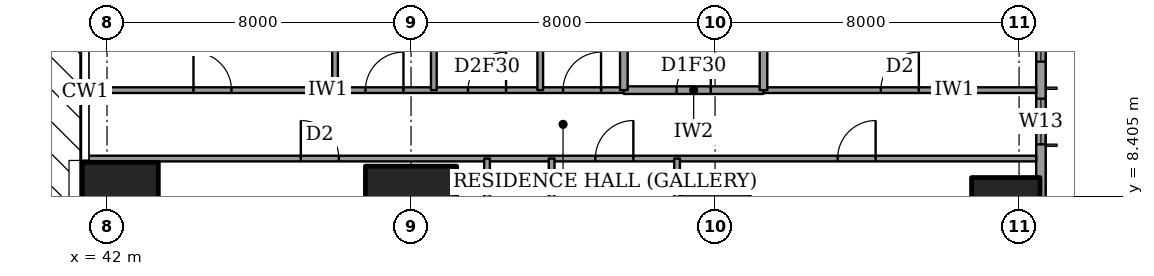
"""IFC4 building model, lengths in metres.
Left out: names, types, materials, properties, quantities, classifications, styles, units other than length and angle.
Written with IfcOpenShell. Run it as: python <this file> out.ifc"""

import sys

from ifc_helpers import new_model, si_unit, direction, frame, frame_2d, origin, origin_2d, place, context, subcontext, project, spatial, rectangle, extrude, element, fill, save


model = new_model("IFC4")
c1 = context("Model", 3, precision=1e-05, world=origin(), true_north=direction((0.0, 1.0)))
c2 = subcontext(c1, "Body", "Model", "MODEL_VIEW")
j1 = project(units=[si_unit("LENGTHUNIT", "METRE"), si_unit("PLANEANGLEUNIT", "RADIAN")], contexts=[c1])
p1 = place(None, origin())
s1 = spatial("IfcSite", under=j1, at=p1, CompositionType="ELEMENT")
p2 = place(p1, origin())
s2 = spatial("IfcBuilding", under=s1, at=p2, CompositionType="ELEMENT")
p3 = place(p2, frame((0.0, 0.0, 182.2)))
s3 = spatial("IfcBuildingStorey", under=s2, at=p3, CompositionType="ELEMENT", Elevation=182.2)
p4 = place(p3, frame((42.35, 8.0, 0.0), z_axis=(0.0, 0.0, 1.0), x_axis=(1.0, 0.0, 0.0)))
e1 = element("IfcColumn", 1, at=p4, inside=s3, PredefinedType="COLUMN", context=c2, shape_type="SweptSolid", body=[
    extrude(rectangle(XDim=2.0, YDim=2.6, at=origin_2d()), origin(), (0.0, 0.0, 1.0), 3.6),
])
p5 = place(p3, frame((50.0, 8.0, 0.0), z_axis=(0.0, 0.0, 1.0), x_axis=(1.0, 0.0, 0.0)))
e2 = element("IfcColumn", 2, at=p5, inside=s3, PredefinedType="COLUMN", context=c2, shape_type="SweptSolid", body=[
    extrude(rectangle(XDim=2.4, YDim=2.4, at=origin_2d()), origin(), (0.0, 0.0, 1.0), 3.6),
])
for number, where, z_axis, x_axis in (
    (3, (58.0, 8.0, 0.0), (0.0, 0.0, 1.0), (1.0, 0.0, 0.0)),
    (4, (65.65, 8.0, 0.0), (0.0, 0.0, 1.0), (1.0, 0.0, 0.0)),
):
    element("IfcColumn", number, at=place(p3, frame(where, z_axis=z_axis, x_axis=x_axis)), inside=s3, PredefinedType="COLUMN", context=c2, shape_type="SweptSolid", body=[
        extrude(rectangle(XDim=1.8, YDim=1.8, at=origin_2d()), origin(), (0.0, 0.0, 1.0), 3.6),
    ])
p6 = place(p3, frame((66.575, 3.175, 0.0), z_axis=(0.0, 0.0, 1.0), x_axis=(0.0, 1.0, 0.0)))
e5 = element("IfcWall", 5, at=p6, inside=s3, PredefinedType="SOLIDWALL", context=c2, shape_type="SweptSolid", body=[
    extrude(rectangle(XDim=41.65, YDim=0.25, at=frame_2d((20.825, 0.0))), origin(), (0.0, 0.0, 1.0), 3.6),
])
p7 = place(p6, frame((0.825, 0.0, 0.2)))
e6 = element("IfcOpeningElement", 6, at=p7, cuts=e5, PredefinedType="OPENING", context=c2, shape_type="SweptSolid", body=[
    extrude(rectangle(XDim=2.4, YDim=2.4, at=frame_2d((1.2, 1.2))), frame((0.0, 0.135, 0.0), z_axis=(0.0, -1.0, 0.0), x_axis=(1.0, 0.0, 0.0)), (0.0, 0.0, 1.0), 0.27),
])
p8 = place(p6, frame((6.6, 0.0, 0.2)))
e7 = element("IfcOpeningElement", 7, at=p8, cuts=e5, PredefinedType="OPENING", context=c2, shape_type="SweptSolid", body=[
    extrude(rectangle(XDim=1.2, YDim=2.4, at=frame_2d((0.6, 1.2))), frame((0.0, 0.135, 0.0), z_axis=(0.0, -1.0, 0.0), x_axis=(1.0, 0.0, 0.0)), (0.0, 0.0, 1.0), 0.27),
])
p9 = place(p6, frame((8.775, 0.0, 0.2)))
e8 = element("IfcOpeningElement", 8, at=p9, cuts=e5, PredefinedType="OPENING", context=c2, shape_type="SweptSolid", body=[
    extrude(rectangle(XDim=2.4, YDim=2.4, at=frame_2d((1.2, 1.2))), frame((0.0, 0.135, 0.0), z_axis=(0.0, -1.0, 0.0), x_axis=(1.0, 0.0, 0.0)), (0.0, 0.0, 1.0), 0.27),
])
p10 = place(p6, frame((15.675, 0.0, 0.2)))
e9 = element("IfcOpeningElement", 9, at=p10, cuts=e5, PredefinedType="OPENING", context=c2, shape_type="SweptSolid", body=[
    extrude(rectangle(XDim=2.4, YDim=2.4, at=frame_2d((1.2, 1.2))), frame((0.0, 0.135, 0.0), z_axis=(0.0, -1.0, 0.0), x_axis=(1.0, 0.0, 0.0)), (0.0, 0.0, 1.0), 0.27),
])
p11 = place(p6, frame((23.575, 0.0, 0.2)))
e10 = element("IfcOpeningElement", 10, at=p11, cuts=e5, PredefinedType="OPENING", context=c2, shape_type="SweptSolid", body=[
    extrude(rectangle(XDim=2.4, YDim=2.4, at=frame_2d((1.2, 1.2))), frame((0.0, 0.135, 0.0), z_axis=(0.0, -1.0, 0.0), x_axis=(1.0, 0.0, 0.0)), (0.0, 0.0, 1.0), 0.27),
])
p12 = place(p6, frame((30.775, 0.0, 0.2)))
e11 = element("IfcOpeningElement", 11, at=p12, cuts=e5, PredefinedType="OPENING", context=c2, shape_type="SweptSolid", body=[
    extrude(rectangle(XDim=2.4, YDim=2.4, at=frame_2d((1.2, 1.2))), frame((0.0, 0.135, 0.0), z_axis=(0.0, -1.0, 0.0), x_axis=(1.0, 0.0, 0.0)), (0.0, 0.0, 1.0), 0.27),
])
p13 = place(p6, frame((34.55, 0.0, 0.2)))
e12 = element("IfcOpeningElement", 12, at=p13, cuts=e5, PredefinedType="OPENING", context=c2, shape_type="SweptSolid", body=[
    extrude(rectangle(XDim=1.2, YDim=2.4, at=frame_2d((0.6, 1.2))), frame((0.0, 0.135, 0.0), z_axis=(0.0, -1.0, 0.0), x_axis=(1.0, 0.0, 0.0)), (0.0, 0.0, 1.0), 0.27),
])
p14 = place(p6, frame((38.425, 0.0, 0.2)))
e13 = element("IfcOpeningElement", 13, at=p14, cuts=e5, PredefinedType="OPENING", context=c2, shape_type="SweptSolid", body=[
    extrude(rectangle(XDim=2.4, YDim=2.4, at=frame_2d((1.2, 1.2))), frame((0.0, 0.135, 0.0), z_axis=(0.0, -1.0, 0.0), x_axis=(1.0, 0.0, 0.0)), (0.0, 0.0, 1.0), 0.27),
])
p15 = place(p3, frame((41.439, 9.4, 0.0), z_axis=(0.0, 0.0, 1.0), x_axis=(1.0, 0.0, 0.0)))
e14 = element("IfcWall", 14, at=p15, inside=s3, PredefinedType="PARTITIONING", context=c2, shape_type="SweptSolid", body=[
    extrude(rectangle(XDim=25.011, YDim=0.15, at=frame_2d((12.505, 0.0))), origin(), (0.0, 0.0, 1.0), 3.35),
])
p16 = place(p15, frame((19.786, 0.0, 0.0)))
e15 = element("IfcOpeningElement", 15, at=p16, cuts=e14, PredefinedType="OPENING", context=c2, shape_type="SweptSolid", body=[
    extrude(rectangle(XDim=1.0, YDim=2.1, at=frame_2d((0.5, 1.05))), frame((0.0, 0.085, 0.0), z_axis=(0.0, -1.0, 0.0), x_axis=(1.0, 0.0, 0.0)), (0.0, 0.0, 1.0), 0.17),
])
p17 = place(p15, frame((13.411, 0.0, 0.0)))
e16 = element("IfcOpeningElement", 16, at=p17, cuts=e14, PredefinedType="OPENING", context=c2, shape_type="SweptSolid", body=[
    extrude(rectangle(XDim=1.0, YDim=2.1, at=frame_2d((0.5, 1.05))), frame((0.0, 0.085, 0.0), z_axis=(0.0, -1.0, 0.0), x_axis=(1.0, 0.0, 0.0)), (0.0, 0.0, 1.0), 0.17),
])
p18 = place(p15, frame((5.661, 0.0, 0.0)))
e17 = element("IfcOpeningElement", 17, at=p18, cuts=e14, PredefinedType="OPENING", context=c2, shape_type="SweptSolid", body=[
    extrude(rectangle(XDim=1.0, YDim=2.1, at=frame_2d((0.5, 1.05))), frame((0.0, 0.085, 0.0), z_axis=(0.0, -1.0, 0.0), x_axis=(1.0, 0.0, 0.0)), (0.0, 0.0, 1.0), 0.17),
])
p19 = place(p3, frame((55.6, 11.2, 0.0), z_axis=(0.0, 0.0, 1.0), x_axis=(1.0, 0.0, 0.0)))
e18 = element("IfcWall", 18, at=p19, inside=s3, PredefinedType="PARTITIONING", context=c2, shape_type="SweptSolid", body=[
    extrude(rectangle(XDim=3.675, YDim=0.2, at=frame_2d((1.837, 0.0))), origin(), (0.0, 0.0, 1.0), 3.35),
])
p20 = place(p19, frame((1.387, 0.0, 0.0)))
e19 = element("IfcOpeningElement", 19, at=p20, cuts=e18, PredefinedType="OPENING", context=c2, shape_type="SweptSolid", body=[
    extrude(rectangle(XDim=0.9, YDim=2.1, at=frame_2d((0.45, 1.05))), frame((0.0, 0.11, 0.0), z_axis=(0.0, -1.0, 0.0), x_axis=(1.0, 0.0, 0.0)), (0.0, 0.0, 1.0), 0.22),
])
p21 = place(p3, frame((41.439, 11.2, 0.0), z_axis=(0.0, 0.0, 1.0), x_axis=(1.0, 0.0, 0.0)))
e20 = element("IfcWall", 20, at=p21, inside=s3, PredefinedType="PARTITIONING", context=c2, shape_type="SweptSolid", body=[
    extrude(rectangle(XDim=14.161, YDim=0.15, at=frame_2d((7.081, 0.0))), origin(), (0.0, 0.0, 1.0), 3.35),
])
p22 = place(p21, frame((12.561, 0.0, 0.0)))
e21 = element("IfcOpeningElement", 21, at=p22, cuts=e20, PredefinedType="OPENING", context=c2, shape_type="SweptSolid", body=[
    extrude(rectangle(XDim=1.0, YDim=2.1, at=frame_2d((0.5, 1.05))), frame((0.0, 0.085, 0.0), z_axis=(0.0, -1.0, 0.0), x_axis=(1.0, 0.0, 0.0)), (0.0, 0.0, 1.0), 0.17),
])
p23 = place(p21, frame((10.061, 0.0, 0.0)))
e22 = element("IfcOpeningElement", 22, at=p23, cuts=e20, PredefinedType="OPENING", context=c2, shape_type="SweptSolid", body=[
    extrude(rectangle(XDim=1.0, YDim=2.1, at=frame_2d((0.5, 1.05))), frame((0.0, 0.085, 0.0), z_axis=(0.0, -1.0, 0.0), x_axis=(1.0, 0.0, 0.0)), (0.0, 0.0, 1.0), 0.17),
])
p24 = place(p21, frame((7.361, 0.0, 0.0)))
e23 = element("IfcOpeningElement", 23, at=p24, cuts=e20, PredefinedType="OPENING", context=c2, shape_type="SweptSolid", body=[
    extrude(rectangle(XDim=1.0, YDim=2.1, at=frame_2d((0.5, 1.05))), frame((0.0, 0.085, 0.0), z_axis=(0.0, -1.0, 0.0), x_axis=(1.0, 0.0, 0.0)), (0.0, 0.0, 1.0), 0.17),
])
p25 = place(p21, frame((2.836, 0.0, 0.0)))
e24 = element("IfcOpeningElement", 24, at=p25, cuts=e20, PredefinedType="OPENING", context=c2, shape_type="SweptSolid", body=[
    extrude(rectangle(XDim=1.0, YDim=2.1, at=frame_2d((0.5, 1.05))), frame((0.0, 0.085, 0.0), z_axis=(0.0, -1.0, 0.0), x_axis=(1.0, 0.0, 0.0)), (0.0, 0.0, 1.0), 0.17),
])
p26 = place(p3, frame((59.275, 11.2, 0.0), z_axis=(0.0, 0.0, 1.0), x_axis=(1.0, 0.0, 0.0)))
e25 = element("IfcWall", 25, at=p26, inside=s3, PredefinedType="PARTITIONING", context=c2, shape_type="SweptSolid", body=[
    extrude(rectangle(XDim=7.175, YDim=0.15, at=frame_2d((3.587, 0.0))), origin(), (0.0, 0.0, 1.0), 3.35),
])
p27 = place(p26, frame((3.087, 0.0, 0.0)))
e26 = element("IfcOpeningElement", 26, at=p27, cuts=e25, PredefinedType="OPENING", context=c2, shape_type="SweptSolid", body=[
    extrude(rectangle(XDim=1.0, YDim=2.1, at=frame_2d((0.5, 1.05))), frame((0.0, 0.085, 0.0), z_axis=(0.0, -1.0, 0.0), x_axis=(1.0, 0.0, 0.0)), (0.0, 0.0, 1.0), 0.17),
])
p28 = place(p3, frame((48.0, 11.2, 0.0), z_axis=(0.0, 0.0, 1.0), x_axis=(0.0, 1.0, 0.0)))
e27 = element("IfcWall", 27, at=p28, inside=s3, PredefinedType="PARTITIONING", context=c2, shape_type="SweptSolid", body=[
    extrude(rectangle(XDim=6.8, YDim=0.15, at=frame_2d((3.4, 0.0))), origin(), (0.0, 0.0, 1.0), 3.35),
])
p29 = place(p3, frame((50.6, 11.2, 0.0), z_axis=(0.0, 0.0, 1.0), x_axis=(0.0, 1.0, 0.0)))
e28 = element("IfcWall", 28, at=p29, inside=s3, PredefinedType="PARTITIONING", context=c2, shape_type="SweptSolid", body=[
    extrude(rectangle(XDim=3.6, YDim=0.15, at=frame_2d((1.8, 0.0))), origin(), (0.0, 0.0, 1.0), 3.35),
])
p30 = place(p3, frame((52.0, -0.45, 0.0), z_axis=(0.0, 0.0, 1.0), x_axis=(0.0, 1.0, 0.0)))
e29 = element("IfcWall", 29, at=p30, inside=s3, PredefinedType="PARTITIONING", context=c2, shape_type="SweptSolid", body=[
    extrude(rectangle(XDim=9.85, YDim=0.15, at=frame_2d((4.925, 0.0))), origin(), (0.0, 0.0, 1.0), 3.35),
])
p31 = place(p3, frame((53.4, 11.2, 0.0), z_axis=(0.0, 0.0, 1.0), x_axis=(0.0, 1.0, 0.0)))
e30 = element("IfcWall", 30, at=p31, inside=s3, PredefinedType="PARTITIONING", context=c2, shape_type="SweptSolid", body=[
    extrude(rectangle(XDim=6.8, YDim=0.15, at=frame_2d((3.4, 0.0))), origin(), (0.0, 0.0, 1.0), 3.35),
])
p32 = place(p3, frame((53.7, -0.45, 0.0), z_axis=(0.0, 0.0, 1.0), x_axis=(0.0, 1.0, 0.0)))
e31 = element("IfcWall", 31, at=p32, inside=s3, PredefinedType="PARTITIONING", context=c2, shape_type="SweptSolid", body=[
    extrude(rectangle(XDim=9.85, YDim=0.15, at=frame_2d((4.925, 0.0))), origin(), (0.0, 0.0, 1.0), 3.35),
])
p33 = place(p32, frame((4.475, 0.0, 0.0)))
e32 = element("IfcOpeningElement", 32, at=p33, cuts=e31, PredefinedType="OPENING", context=c2, shape_type="SweptSolid", body=[
    extrude(rectangle(XDim=0.9, YDim=2.1, at=frame_2d((0.45, 1.05))), frame((0.0, 0.085, 0.0), z_axis=(0.0, -1.0, 0.0), x_axis=(1.0, 0.0, 0.0)), (0.0, 0.0, 1.0), 0.17),
])
p34 = place(p3, frame((55.6, 11.2, 0.0), z_axis=(0.0, 0.0, 1.0), x_axis=(0.0, 1.0, 0.0)))
e33 = element("IfcWall", 33, at=p34, inside=s3, PredefinedType="PARTITIONING", context=c2, shape_type="SweptSolid", body=[
    extrude(rectangle(XDim=3.4, YDim=0.2, at=frame_2d((1.7, 0.0))), origin(), (0.0, 0.0, 1.0), 3.35),
])
p35 = place(p3, frame((57.0, -0.45, 0.0), z_axis=(0.0, 0.0, 1.0), x_axis=(0.0, 1.0, 0.0)))
e34 = element("IfcWall", 34, at=p35, inside=s3, PredefinedType="PARTITIONING", context=c2, shape_type="SweptSolid", body=[
    extrude(rectangle(XDim=9.85, YDim=0.15, at=frame_2d((4.925, 0.0))), origin(), (0.0, 0.0, 1.0), 3.35),
])
p36 = place(p3, frame((59.275, 11.2, 0.0), z_axis=(0.0, 0.0, 1.0), x_axis=(0.0, 1.0, 0.0)))
e35 = element("IfcWall", 35, at=p36, inside=s3, PredefinedType="PARTITIONING", context=c2, shape_type="SweptSolid", body=[
    extrude(rectangle(XDim=3.4, YDim=0.2, at=frame_2d((1.7, 0.0))), origin(), (0.0, 0.0, 1.0), 3.35),
])
p37 = place(p8, origin())
e36 = element("IfcWindow", 36, at=p37, inside=s3, PartitioningType="SINGLE_PANEL", PredefinedType="WINDOW", context=c2, shape_type="SweptSolid", body=[
    extrude(rectangle(XDim=1.2, YDim=2.4, at=frame_2d((0.6, 1.2))), frame((0.0, 0.03, 0.0), z_axis=(0.0, -1.0, 0.0), x_axis=(1.0, 0.0, 0.0)), (0.0, 0.0, 1.0), 0.06),
])
fill(e7, e36)
p38 = place(p9, origin())
e37 = element("IfcWindow", 37, at=p38, inside=s3, PartitioningType="SINGLE_PANEL", PredefinedType="WINDOW", context=c2, shape_type="SweptSolid", body=[
    extrude(rectangle(XDim=2.4, YDim=2.4, at=frame_2d((1.2, 1.2))), frame((0.0, 0.03, 0.0), z_axis=(0.0, -1.0, 0.0), x_axis=(1.0, 0.0, 0.0)), (0.0, 0.0, 1.0), 0.06),
])
fill(e8, e37)
p39 = place(p16, origin())
e38 = element("IfcDoor", 38, at=p39, inside=s3, OperationType="SINGLE_SWING_LEFT", PredefinedType="DOOR", context=c2, shape_type="SweptSolid", body=[
    extrude(rectangle(XDim=1.0, YDim=2.1, at=frame_2d((0.5, 1.05))), frame((0.0, 0.025, 0.0), z_axis=(0.0, -1.0, 0.0), x_axis=(1.0, 0.0, 0.0)), (0.0, 0.0, 1.0), 0.05),
])
fill(e15, e38)
p40 = place(p17, origin())
e39 = element("IfcDoor", 39, at=p40, inside=s3, OperationType="SINGLE_SWING_LEFT", PredefinedType="DOOR", context=c2, shape_type="SweptSolid", body=[
    extrude(rectangle(XDim=1.0, YDim=2.1, at=frame_2d((0.5, 1.05))), frame((0.0, 0.025, 0.0), z_axis=(0.0, -1.0, 0.0), x_axis=(1.0, 0.0, 0.0)), (0.0, 0.0, 1.0), 0.05),
])
fill(e16, e39)
p41 = place(p18, origin())
e40 = element("IfcDoor", 40, at=p41, inside=s3, OperationType="SINGLE_SWING_RIGHT", PredefinedType="DOOR", context=c2, shape_type="SweptSolid", body=[
    extrude(rectangle(XDim=1.0, YDim=2.1, at=frame_2d((0.5, 1.05))), frame((0.0, 0.025, 0.0), z_axis=(0.0, -1.0, 0.0), x_axis=(1.0, 0.0, 0.0)), (0.0, 0.0, 1.0), 0.05),
])
fill(e17, e40)
p42 = place(p22, origin())
e41 = element("IfcDoor", 41, at=p42, inside=s3, OperationType="SINGLE_SWING_LEFT", PredefinedType="DOOR", context=c2, shape_type="SweptSolid", body=[
    extrude(rectangle(XDim=1.0, YDim=2.1, at=frame_2d((0.5, 1.05))), frame((0.0, 0.025, 0.0), z_axis=(0.0, -1.0, 0.0), x_axis=(1.0, 0.0, 0.0)), (0.0, 0.0, 1.0), 0.05),
])
fill(e21, e41)
p43 = place(p27, origin())
e42 = element("IfcDoor", 42, at=p43, inside=s3, OperationType="SINGLE_SWING_LEFT", PredefinedType="DOOR", context=c2, shape_type="SweptSolid", body=[
    extrude(rectangle(XDim=1.0, YDim=2.1, at=frame_2d((0.5, 1.05))), frame((0.0, 0.025, 0.0), z_axis=(0.0, -1.0, 0.0), x_axis=(1.0, 0.0, 0.0)), (0.0, 0.0, 1.0), 0.05),
])
fill(e26, e42)
p44 = place(p20, origin())
e43 = element("IfcDoor", 43, at=p44, inside=s3, OperationType="SINGLE_SWING_LEFT", PredefinedType="DOOR", context=c2, shape_type="SweptSolid", body=[
    extrude(rectangle(XDim=0.9, YDim=2.1, at=frame_2d((0.45, 1.05))), frame((0.0, 0.025, 0.0), z_axis=(0.0, -1.0, 0.0), x_axis=(1.0, 0.0, 0.0)), (0.0, 0.0, 1.0), 0.05),
])
fill(e19, e43)
p45 = place(p23, origin())
e44 = element("IfcDoor", 44, at=p45, inside=s3, OperationType="SINGLE_SWING_LEFT", PredefinedType="DOOR", context=c2, shape_type="SweptSolid", body=[
    extrude(rectangle(XDim=1.0, YDim=2.1, at=frame_2d((0.5, 1.05))), frame((0.0, 0.025, 0.0), z_axis=(0.0, -1.0, 0.0), x_axis=(1.0, 0.0, 0.0)), (0.0, 0.0, 1.0), 0.05),
])
fill(e22, e44)
p46 = place(p24, origin())
e45 = element("IfcDoor", 45, at=p46, inside=s3, OperationType="SINGLE_SWING_LEFT", PredefinedType="DOOR", context=c2, shape_type="SweptSolid", body=[
    extrude(rectangle(XDim=1.0, YDim=2.1, at=frame_2d((0.5, 1.05))), frame((0.0, 0.025, 0.0), z_axis=(0.0, -1.0, 0.0), x_axis=(1.0, 0.0, 0.0)), (0.0, 0.0, 1.0), 0.05),
])
fill(e23, e45)
p47 = place(p25, origin())
e46 = element("IfcDoor", 46, at=p47, inside=s3, OperationType="SINGLE_SWING_RIGHT", PredefinedType="DOOR", context=c2, shape_type="SweptSolid", body=[
    extrude(rectangle(XDim=1.0, YDim=2.1, at=frame_2d((0.5, 1.05))), frame((0.0, 0.025, 0.0), z_axis=(0.0, -1.0, 0.0), x_axis=(1.0, 0.0, 0.0)), (0.0, 0.0, 1.0), 0.05),
])
fill(e24, e46)
save(model, sys.argv[1])
